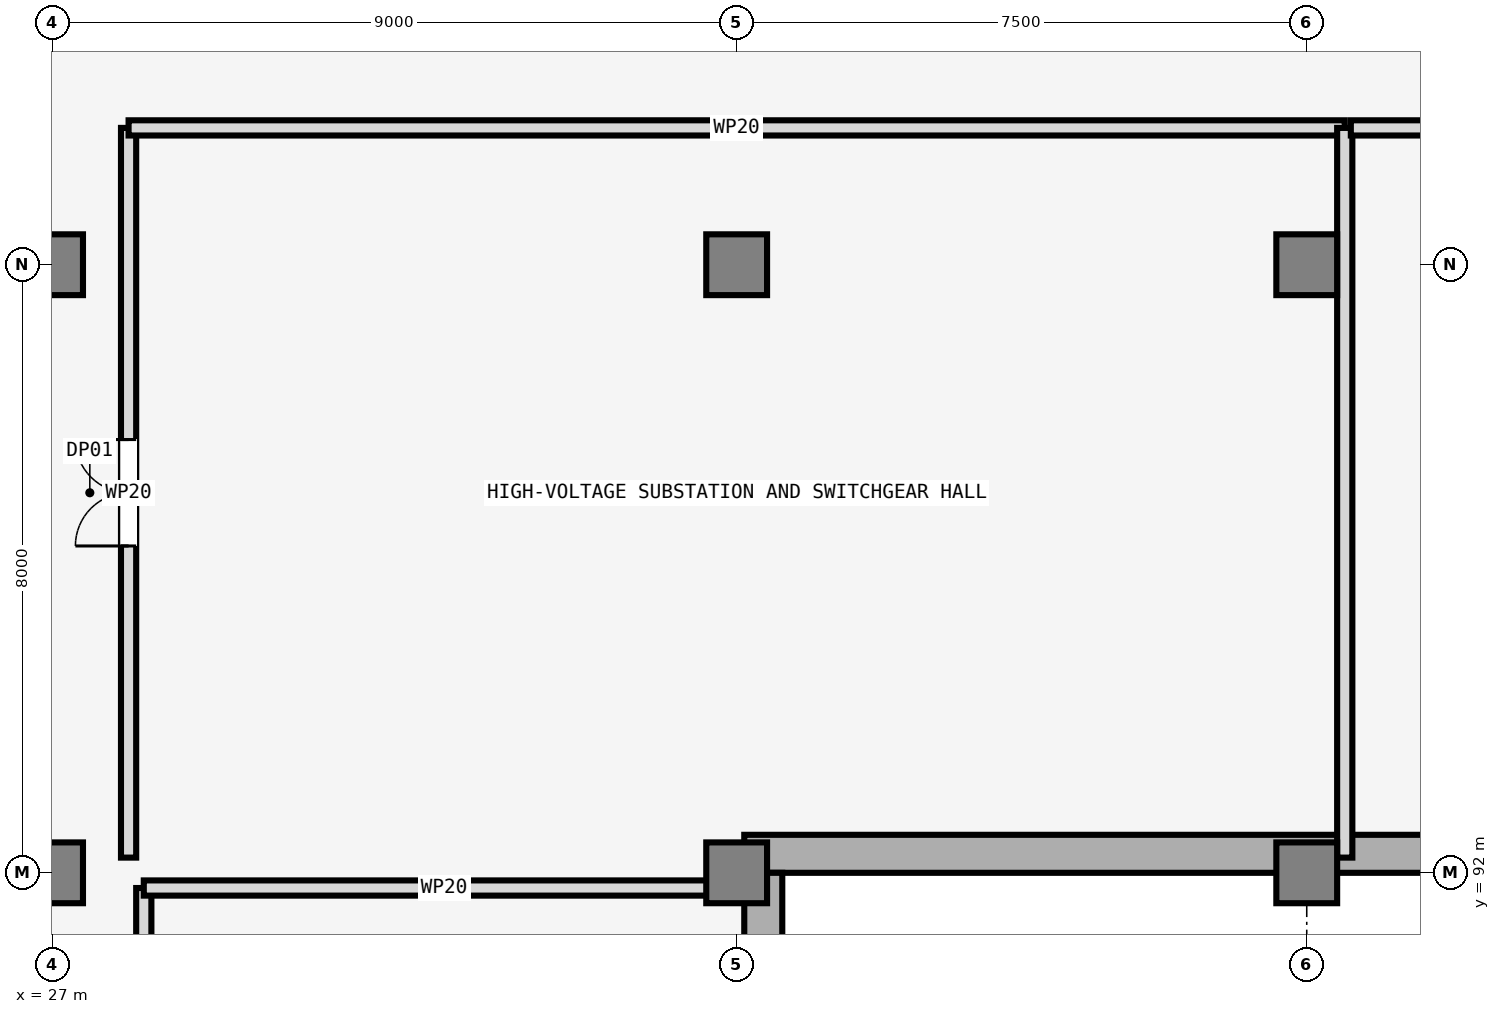
"""IFC4 building model, lengths in metres.
Left out: names, types, materials, properties, quantities, classifications, styles, units other than length and angle.
Written with IfcOpenShell. Run it as: python <this file> out.ifc"""

import sys

from ifc_helpers import new_model, si_unit, direction, frame, frame_2d, origin, origin_2d, place, context, subcontext, project, spatial, rectangle, extrude, element, fill, save


model = new_model("IFC4")
c1 = context("Model", 3, precision=1e-05, world=origin(), true_north=direction((0.0, 1.0)))
c2 = subcontext(c1, "Body", "Model", "MODEL_VIEW")
j1 = project(units=[si_unit("LENGTHUNIT", "METRE"), si_unit("PLANEANGLEUNIT", "RADIAN")], contexts=[c1])
p1 = place(None, origin())
s1 = spatial("IfcSite", under=j1, at=p1, CompositionType="ELEMENT")
p2 = place(p1, origin())
s2 = spatial("IfcBuilding", under=s1, at=p2, CompositionType="ELEMENT")
p3 = place(p2, frame((0.0, 0.0, -5.4)))
s3 = spatial("IfcBuildingStorey", under=s2, at=p3, CompositionType="ELEMENT", Elevation=-5.4)
p4 = place(p3, frame((66.6, 92.25, 0.0), z_axis=(0.0, 0.0, 1.0), x_axis=(-1.0, 0.0, 0.0)))
e1 = element("IfcWall", 1, at=p4, inside=s3, PredefinedType="USERDEFINED", context=c2, shape_type="SweptSolid", body=[
    extrude(rectangle(XDim=30.5, YDim=0.5, at=frame_2d((15.25, 0.0))), origin(), (0.0, 0.0, 1.0), 5.08),
])
p5 = place(p3, frame((36.35, 92.0, 0.0), z_axis=(0.0, 0.0, 1.0), x_axis=(0.0, -1.0, 0.0)))
e2 = element("IfcWall", 2, at=p5, inside=s3, PredefinedType="USERDEFINED", context=c2, shape_type="SweptSolid", body=[
    extrude(rectangle(XDim=33.9, YDim=0.5, at=frame_2d((16.95, 0.0))), origin(), (0.0, 0.0, 1.0), 5.08),
])
for number, where, z_axis, x_axis in (
    (3, (27.0, 92.0, 0.0), (0.0, 0.0, 1.0), (1.0, 0.0, 0.0)),
    (4, (27.0, 100.0, 0.0), (0.0, 0.0, 1.0), (1.0, 0.0, 0.0)),
    (5, (36.0, 92.0, 0.0), (0.0, 0.0, 1.0), (1.0, 0.0, 0.0)),
    (6, (36.0, 100.0, 0.0), (0.0, 0.0, 1.0), (1.0, 0.0, 0.0)),
    (7, (43.5, 92.0, 0.0), (0.0, 0.0, 1.0), (1.0, 0.0, 0.0)),
    (8, (43.5, 100.0, 0.0), (0.0, 0.0, 1.0), (1.0, 0.0, 0.0)),
):
    element("IfcColumn", number, at=place(p3, frame(where, z_axis=z_axis, x_axis=x_axis)), inside=s3, PredefinedType="COLUMN", context=c2, shape_type="SweptSolid", body=[
        extrude(rectangle(XDim=0.8, YDim=0.8, at=origin_2d()), origin(), (0.0, 0.0, 1.0), 5.4),
    ])
p6 = place(p3, frame((28.2, 58.8, 0.0), z_axis=(0.0, 0.0, 1.0), x_axis=(0.0, 1.0, 0.0)))
e9 = element("IfcWall", 9, at=p6, inside=s3, PredefinedType="PARTITIONING", context=c2, shape_type="SweptSolid", body=[
    extrude(rectangle(XDim=33.0, YDim=0.2, at=frame_2d((16.5, 0.0))), origin(), (0.0, 0.0, 1.0), 4.05),
])
p7 = place(p6, frame((17.45, 0.0, 0.0)))
e10 = element("IfcOpeningElement", 10, at=p7, cuts=e9, PredefinedType="OPENING", context=c2, shape_type="SweptSolid", body=[
    extrude(rectangle(XDim=1.4, YDim=2.2, at=frame_2d((0.7, 1.1))), frame((0.0, 0.11, 0.0), z_axis=(0.0, -1.0, 0.0), x_axis=(1.0, 0.0, 0.0)), (0.0, 0.0, 1.0), 0.22),
])
p8 = place(p3, frame((28.2, 91.8, 0.0), z_axis=(0.0, 0.0, 1.0), x_axis=(1.0, 0.0, 0.0)))
e11 = element("IfcWall", 11, at=p8, inside=s3, PredefinedType="PARTITIONING", context=c2, shape_type="SweptSolid", body=[
    extrude(rectangle(XDim=7.9, YDim=0.2, at=frame_2d((3.95, 0.0))), origin(), (0.0, 0.0, 1.0), 4.05),
])
p9 = place(p3, frame((28.0, 92.2, 0.0), z_axis=(0.0, 0.0, 1.0), x_axis=(0.0, 1.0, 0.0)))
e12 = element("IfcWall", 12, at=p9, inside=s3, PredefinedType="PARTITIONING", context=c2, shape_type="SweptSolid", body=[
    extrude(rectangle(XDim=9.6, YDim=0.2, at=frame_2d((4.8, 0.0))), origin(), (0.0, 0.0, 1.0), 4.05),
])
p10 = place(p9, frame((4.1, 0.0, 0.0)))
e13 = element("IfcOpeningElement", 13, at=p10, cuts=e12, PredefinedType="OPENING", context=c2, shape_type="SweptSolid", body=[
    extrude(rectangle(XDim=1.4, YDim=2.2, at=frame_2d((0.7, 1.1))), frame((0.0, 0.11, 0.0), z_axis=(0.0, -1.0, 0.0), x_axis=(1.0, 0.0, 0.0)), (0.0, 0.0, 1.0), 0.22),
])
p11 = place(p3, frame((28.0, 101.8, 0.0), z_axis=(0.0, 0.0, 1.0), x_axis=(1.0, 0.0, 0.0)))
e14 = element("IfcWall", 14, at=p11, inside=s3, PredefinedType="PARTITIONING", context=c2, shape_type="SweptSolid", body=[
    extrude(rectangle(XDim=16.0, YDim=0.2, at=frame_2d((8.0, 0.0))), origin(), (0.0, 0.0, 1.0), 4.05),
])
p12 = place(p3, frame((44.0, 101.8, 0.0), z_axis=(0.0, 0.0, 1.0), x_axis=(0.0, -1.0, 0.0)))
e15 = element("IfcWall", 15, at=p12, inside=s3, PredefinedType="PARTITIONING", context=c2, shape_type="SweptSolid", body=[
    extrude(rectangle(XDim=9.6, YDim=0.2, at=frame_2d((4.8, 0.0))), origin(), (0.0, 0.0, 1.0), 4.05),
])
p13 = place(p3, frame((44.08, 101.8, 0.0), z_axis=(0.0, 0.0, 1.0), x_axis=(1.0, 0.0, 0.0)))
e16 = element("IfcWall", 16, at=p13, inside=s3, PredefinedType="PARTITIONING", context=c2, shape_type="SweptSolid", body=[
    extrude(rectangle(XDim=22.04, YDim=0.2, at=frame_2d((11.02, 0.0))), origin(), (0.0, 0.0, 1.0), 4.05),
])
p14 = place(p13, frame((10.32, 0.0, 0.0)))
e17 = element("IfcOpeningElement", 17, at=p14, cuts=e16, PredefinedType="OPENING", context=c2, shape_type="SweptSolid", body=[
    extrude(rectangle(XDim=1.4, YDim=2.2, at=frame_2d((0.7, 1.1))), frame((0.0, 0.11, 0.0), z_axis=(0.0, -1.0, 0.0), x_axis=(1.0, 0.0, 0.0)), (0.0, 0.0, 1.0), 0.22),
])
p15 = place(p10, origin())
e18 = element("IfcDoor", 18, at=p15, inside=s3, OperationType="DOUBLE_DOOR_SINGLE_SWING", PredefinedType="DOOR", context=c2, shape_type="SweptSolid", body=[
    extrude(rectangle(XDim=1.4, YDim=2.2, at=frame_2d((0.7, 1.1))), frame((0.0, 0.025, 0.0), z_axis=(0.0, -1.0, 0.0), x_axis=(1.0, 0.0, 0.0)), (0.0, 0.0, 1.0), 0.05),
])
fill(e13, e18)
save(model, sys.argv[1])
